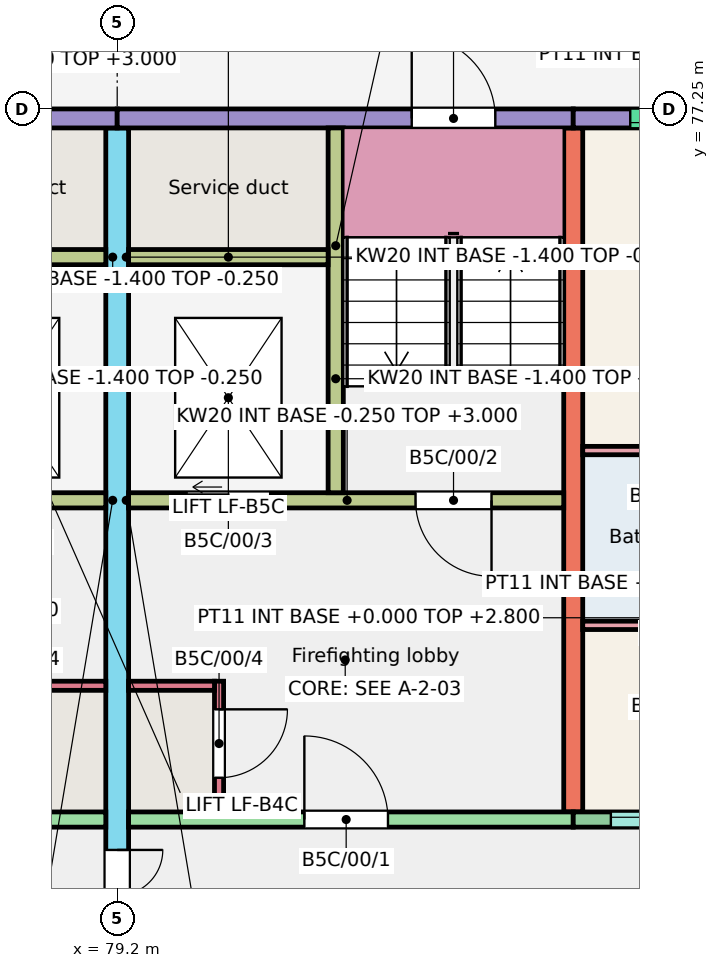
"""IFC4 building model, lengths in metres.
Left out: names, types, materials, properties, quantities, classifications, styles, units other than length and angle.
Written with IfcOpenShell. Run it as: python <this file> out.ifc"""

import sys

from ifc_helpers import new_model, si_unit, direction, frame, frame_2d, origin, place, context, subcontext, project, spatial, rectangle, extrude, element, fill, save


model = new_model("IFC4")
c1 = context("Model", 3, precision=1e-05, world=origin(), true_north=direction((0.0, 1.0)))
c2 = subcontext(c1, "Body", "Model", "MODEL_VIEW")
j1 = project(units=[si_unit("LENGTHUNIT", "METRE"), si_unit("PLANEANGLEUNIT", "RADIAN")], contexts=[c1])
p1 = place(None, origin())
s1 = spatial("IfcSite", under=j1, at=p1, CompositionType="ELEMENT")
p2 = place(p1, origin())
s2 = spatial("IfcBuilding", under=s1, at=p2, CompositionType="ELEMENT")
p3 = place(p2, origin())
s3 = spatial("IfcBuildingStorey", under=s2, at=p3, CompositionType="ELEMENT", Elevation=0.0)
p4 = place(p3, frame((79.2, 66.0, -0.25), z_axis=(0.0, 0.0, 1.0), x_axis=(0.0, 1.0, 0.0)))
e1 = element("IfcWall", 1, at=p4, inside=s3, PredefinedType="SHEAR", context=c2, shape_type="SweptSolid", body=[
    extrude(rectangle(XDim=11.0, YDim=0.3, at=frame_2d((5.5, 0.0))), origin(), (0.0, 0.0, 1.0), 3.25),
])
p5 = place(p4, frame((0.3, 0.0, 0.25)))
e2 = element("IfcOpeningElement", 2, at=p5, cuts=e1, PredefinedType="OPENING", context=c2, shape_type="SweptSolid", body=[
    extrude(rectangle(XDim=1.2, YDim=2.1, at=frame_2d((0.6, 1.05))), frame((0.0, 0.16, 0.0), z_axis=(0.0, -1.0, 0.0), x_axis=(1.0, 0.0, 0.0)), (0.0, 0.0, 1.0), 0.32),
])
p6 = place(p3, frame((85.2, 68.0, -0.25), z_axis=(0.0, 0.0, 1.0), x_axis=(0.0, 1.0, 0.0)))
e3 = element("IfcWall", 3, at=p6, inside=s3, PredefinedType="SHEAR", context=c2, shape_type="SweptSolid", body=[
    extrude(rectangle(XDim=9.0, YDim=0.25, at=frame_2d((4.5, 0.0))), origin(), (0.0, 0.0, 1.0), 3.25),
])
p7 = place(p3, frame((73.2, 77.125, -0.25), z_axis=(0.0, 0.0, 1.0), x_axis=(1.0, 0.0, 0.0)))
e4 = element("IfcWall", 4, at=p7, inside=s3, PredefinedType="SOLIDWALL", context=c2, shape_type="SweptSolid", body=[
    extrude(rectangle(XDim=6.0, YDim=0.25, at=frame_2d((3.0, 0.0))), origin(), (0.0, 0.0, 1.0), 3.25),
])
p8 = place(p7, frame((1.025, 0.0, 0.25)))
e5 = element("IfcOpeningElement", 5, at=p8, cuts=e4, PredefinedType="OPENING", context=c2, shape_type="SweptSolid", body=[
    extrude(rectangle(XDim=1.1, YDim=2.1, at=frame_2d((0.55, 1.05))), frame((0.0, 0.135, 0.0), z_axis=(0.0, -1.0, 0.0), x_axis=(1.0, 0.0, 0.0)), (0.0, 0.0, 1.0), 0.27),
])
p9 = place(p3, frame((73.2, 67.9, -0.25), z_axis=(0.0, 0.0, 1.0), x_axis=(1.0, 0.0, 0.0)))
e6 = element("IfcWall", 6, at=p9, inside=s3, PredefinedType="SHEAR", context=c2, shape_type="SweptSolid", body=[
    extrude(rectangle(XDim=5.85, YDim=0.2, at=frame_2d((2.925, 0.0))), origin(), (0.0, 0.0, 1.0), 3.25),
])
p10 = place(p9, frame((2.438, 0.0, 0.25)))
e7 = element("IfcOpeningElement", 7, at=p10, cuts=e6, PredefinedType="OPENING", context=c2, shape_type="SweptSolid", body=[
    extrude(rectangle(XDim=1.1, YDim=2.1, at=frame_2d((0.55, 1.05))), frame((0.0, 0.11, 0.0), z_axis=(0.0, -1.0, 0.0), x_axis=(1.0, 0.0, 0.0)), (0.0, 0.0, 1.0), 0.22),
])
p11 = place(p3, frame((73.325, 72.1, -0.25), z_axis=(0.0, 0.0, 1.0), x_axis=(1.0, 0.0, 0.0)))
e8 = element("IfcWall", 8, at=p11, inside=s3, PredefinedType="SHEAR", context=c2, shape_type="SweptSolid", body=[
    extrude(rectangle(XDim=5.725, YDim=0.2, at=frame_2d((2.863, 0.0))), origin(), (0.0, 0.0, 1.0), 3.25),
])
p12 = place(p11, frame((0.95, 0.0, 0.25)))
e9 = element("IfcOpeningElement", 9, at=p12, cuts=e8, PredefinedType="OPENING", context=c2, shape_type="SweptSolid", body=[
    extrude(rectangle(XDim=1.0, YDim=2.1, at=frame_2d((0.5, 1.05))), frame((0.0, 0.11, 0.0), z_axis=(0.0, -1.0, 0.0), x_axis=(1.0, 0.0, 0.0)), (0.0, 0.0, 1.0), 0.22),
])
p13 = place(p11, frame((3.863, 0.0, 0.25)))
e10 = element("IfcOpeningElement", 10, at=p13, cuts=e8, PredefinedType="OPENING", context=c2, shape_type="SweptSolid", body=[
    extrude(rectangle(XDim=1.1, YDim=2.1, at=frame_2d((0.55, 1.05))), frame((0.0, 0.11, 0.0), z_axis=(0.0, -1.0, 0.0), x_axis=(1.0, 0.0, 0.0)), (0.0, 0.0, 1.0), 0.22),
])
p14 = place(p3, frame((76.425, 75.3, -0.25), z_axis=(0.0, 0.0, 1.0), x_axis=(1.0, 0.0, 0.0)))
e11 = element("IfcWall", 11, at=p14, inside=s3, PredefinedType="SHEAR", context=c2, shape_type="SweptSolid", body=[
    extrude(rectangle(XDim=2.625, YDim=0.2, at=frame_2d((1.312, 0.0))), origin(), (0.0, 0.0, 1.0), 3.25),
])
p15 = place(p3, frame((77.92, 69.66, -0.25), z_axis=(0.0, 0.0, 1.0), x_axis=(1.0, 0.0, 0.0)))
e12 = element("IfcWall", 12, at=p15, inside=s3, PredefinedType="SHEAR", context=c2, shape_type="SweptSolid", body=[
    extrude(rectangle(XDim=1.13, YDim=0.12, at=frame_2d((0.565, 0.0))), origin(), (0.0, 0.0, 1.0), 3.25),
])
p16 = place(p3, frame((79.2, 77.125, -0.25), z_axis=(0.0, 0.0, 1.0), x_axis=(1.0, 0.0, 0.0)))
e13 = element("IfcWall", 13, at=p16, inside=s3, PredefinedType="SOLIDWALL", context=c2, shape_type="SweptSolid", body=[
    extrude(rectangle(XDim=6.0, YDim=0.25, at=frame_2d((3.0, 0.0))), origin(), (0.0, 0.0, 1.0), 3.25),
])
p17 = place(p16, frame((3.875, 0.0, 0.25)))
e14 = element("IfcOpeningElement", 14, at=p17, cuts=e13, PredefinedType="OPENING", context=c2, shape_type="SweptSolid", body=[
    extrude(rectangle(XDim=1.1, YDim=2.1, at=frame_2d((0.55, 1.05))), frame((0.0, 0.135, 0.0), z_axis=(0.0, -1.0, 0.0), x_axis=(1.0, 0.0, 0.0)), (0.0, 0.0, 1.0), 0.27),
])
p18 = place(p3, frame((79.35, 67.9, -0.25), z_axis=(0.0, 0.0, 1.0), x_axis=(1.0, 0.0, 0.0)))
e15 = element("IfcWall", 15, at=p18, inside=s3, PredefinedType="SHEAR", context=c2, shape_type="SweptSolid", body=[
    extrude(rectangle(XDim=5.85, YDim=0.2, at=frame_2d((2.925, 0.0))), origin(), (0.0, 0.0, 1.0), 3.25),
])
p19 = place(p18, frame((2.312, 0.0, 0.25)))
e16 = element("IfcOpeningElement", 16, at=p19, cuts=e15, PredefinedType="OPENING", context=c2, shape_type="SweptSolid", body=[
    extrude(rectangle(XDim=1.1, YDim=2.1, at=frame_2d((0.55, 1.05))), frame((0.0, 0.11, 0.0), z_axis=(0.0, -1.0, 0.0), x_axis=(1.0, 0.0, 0.0)), (0.0, 0.0, 1.0), 0.22),
])
p20 = place(p3, frame((79.35, 72.1, -0.25), z_axis=(0.0, 0.0, 1.0), x_axis=(1.0, 0.0, 0.0)))
e17 = element("IfcWall", 17, at=p20, inside=s3, PredefinedType="SHEAR", context=c2, shape_type="SweptSolid", body=[
    extrude(rectangle(XDim=5.725, YDim=0.2, at=frame_2d((2.862, 0.0))), origin(), (0.0, 0.0, 1.0), 3.25),
])
p21 = place(p20, frame((3.775, 0.0, 0.25)))
e18 = element("IfcOpeningElement", 18, at=p21, cuts=e17, PredefinedType="OPENING", context=c2, shape_type="SweptSolid", body=[
    extrude(rectangle(XDim=1.0, YDim=2.1, at=frame_2d((0.5, 1.05))), frame((0.0, 0.11, 0.0), z_axis=(0.0, -1.0, 0.0), x_axis=(1.0, 0.0, 0.0)), (0.0, 0.0, 1.0), 0.22),
])
p22 = place(p20, frame((0.762, 0.0, 0.25)))
e19 = element("IfcOpeningElement", 19, at=p22, cuts=e17, PredefinedType="OPENING", context=c2, shape_type="SweptSolid", body=[
    extrude(rectangle(XDim=1.1, YDim=2.1, at=frame_2d((0.55, 1.05))), frame((0.0, 0.11, 0.0), z_axis=(0.0, -1.0, 0.0), x_axis=(1.0, 0.0, 0.0)), (0.0, 0.0, 1.0), 0.22),
])
p23 = place(p3, frame((82.075, 72.2, -0.25), z_axis=(0.0, 0.0, 1.0), x_axis=(0.0, 1.0, 0.0)))
e20 = element("IfcWall", 20, at=p23, inside=s3, PredefinedType="SHEAR", context=c2, shape_type="SweptSolid", body=[
    extrude(rectangle(XDim=4.8, YDim=0.2, at=frame_2d((2.4, 0.0))), origin(), (0.0, 0.0, 1.0), 3.25),
])
p24 = place(p3, frame((79.35, 75.3, -0.25), z_axis=(0.0, 0.0, 1.0), x_axis=(1.0, 0.0, 0.0)))
e21 = element("IfcWall", 21, at=p24, inside=s3, PredefinedType="SHEAR", context=c2, shape_type="SweptSolid", body=[
    extrude(rectangle(XDim=2.625, YDim=0.2, at=frame_2d((1.312, 0.0))), origin(), (0.0, 0.0, 1.0), 3.25),
])
p25 = place(p3, frame((80.54, 68.0, -0.25), z_axis=(0.0, 0.0, 1.0), x_axis=(0.0, 1.0, 0.0)))
e22 = element("IfcWall", 22, at=p25, inside=s3, PredefinedType="SHEAR", context=c2, shape_type="SweptSolid", body=[
    extrude(rectangle(XDim=1.72, YDim=0.12, at=frame_2d((0.86, 0.0))), origin(), (0.0, 0.0, 1.0), 3.25),
])
p26 = place(p25, frame((0.45, 0.0, 0.25)))
e23 = element("IfcOpeningElement", 23, at=p26, cuts=e22, PredefinedType="OPENING", context=c2, shape_type="SweptSolid", body=[
    extrude(rectangle(XDim=0.9, YDim=2.1, at=frame_2d((0.45, 1.05))), frame((0.0, 0.07, 0.0), z_axis=(0.0, -1.0, 0.0), x_axis=(1.0, 0.0, 0.0)), (0.0, 0.0, 1.0), 0.14),
])
p27 = place(p3, frame((79.35, 69.66, -0.25), z_axis=(0.0, 0.0, 1.0), x_axis=(1.0, 0.0, 0.0)))
e24 = element("IfcWall", 24, at=p27, inside=s3, PredefinedType="SHEAR", context=c2, shape_type="SweptSolid", body=[
    extrude(rectangle(XDim=1.13, YDim=0.12, at=frame_2d((0.565, 0.0))), origin(), (0.0, 0.0, 1.0), 3.25),
])
p28 = place(p3, frame((85.2, 77.125, -0.25), z_axis=(0.0, 0.0, 1.0), x_axis=(1.0, 0.0, 0.0)))
e25 = element("IfcWall", 25, at=p28, inside=s3, PredefinedType="SOLIDWALL", context=c2, shape_type="SweptSolid", body=[
    extrude(rectangle(XDim=3.6, YDim=0.25, at=frame_2d((1.8, 0.0))), origin(), (0.0, 0.0, 1.0), 3.25),
])
p29 = place(p28, frame((0.75, 0.0, 1.45)))
e26 = element("IfcOpeningElement", 26, at=p29, cuts=e25, PredefinedType="OPENING", context=c2, shape_type="SweptSolid", body=[
    extrude(rectangle(XDim=2.1, YDim=1.2, at=frame_2d((1.05, 0.6))), frame((0.0, 0.135, 0.0), z_axis=(0.0, -1.0, 0.0), x_axis=(1.0, 0.0, 0.0)), (0.0, 0.0, 1.0), 0.27),
])
p30 = place(p3, frame((85.2, 67.9, -0.25), z_axis=(0.0, 0.0, 1.0), x_axis=(1.0, 0.0, 0.0)))
e27 = element("IfcWall", 27, at=p30, inside=s3, PredefinedType="SOLIDWALL", context=c2, shape_type="SweptSolid", body=[
    extrude(rectangle(XDim=3.6, YDim=0.2, at=frame_2d((1.8, 0.0))), origin(), (0.0, 0.0, 1.0), 3.25),
])
p31 = place(p30, frame((0.495, 0.0, 1.35)))
e28 = element("IfcOpeningElement", 28, at=p31, cuts=e27, PredefinedType="OPENING", context=c2, shape_type="SweptSolid", body=[
    extrude(rectangle(XDim=1.2, YDim=1.3, at=frame_2d((0.6, 0.65))), frame((0.0, 0.11, 0.0), z_axis=(0.0, -1.0, 0.0), x_axis=(1.0, 0.0, 0.0)), (0.0, 0.0, 1.0), 0.22),
])
p32 = place(p30, frame((2.325, 0.0, 0.25)))
e29 = element("IfcOpeningElement", 29, at=p32, cuts=e27, PredefinedType="OPENING", context=c2, shape_type="SweptSolid", body=[
    extrude(rectangle(XDim=1.0, YDim=2.1, at=frame_2d((0.5, 1.05))), frame((0.0, 0.11, 0.0), z_axis=(0.0, -1.0, 0.0), x_axis=(1.0, 0.0, 0.0)), (0.0, 0.0, 1.0), 0.22),
])
for number, where, z_axis, x_axis in (
    (30, (76.225, 72.1, -1.4), (0.0, 0.0, 1.0), (1.0, 0.0, 0.0)),
    (31, (76.225, 75.3, -1.4), (0.0, 0.0, 1.0), (1.0, 0.0, 0.0)),
):
    element("IfcWall", number, at=place(p3, frame(where, z_axis=z_axis, x_axis=x_axis)), inside=s3, PredefinedType="SHEAR", context=c2, shape_type="SweptSolid", body=[
        extrude(rectangle(XDim=2.975, YDim=0.2, at=frame_2d((1.487, 0.0))), origin(), (0.0, 0.0, 1.0), 1.15),
    ])
p33 = place(p3, frame((79.125, 72.2, -1.4), z_axis=(0.0, 0.0, 1.0), x_axis=(0.0, 1.0, 0.0)))
e32 = element("IfcWall", 32, at=p33, inside=s3, PredefinedType="SHEAR", context=c2, shape_type="SweptSolid", body=[
    extrude(rectangle(XDim=3.0, YDim=0.15, at=frame_2d((1.5, 0.0))), origin(), (0.0, 0.0, 1.0), 1.15),
])
for number, where, z_axis, x_axis in (
    (33, (79.2, 72.1, -1.4), (0.0, 0.0, 1.0), (1.0, 0.0, 0.0)),
    (34, (79.2, 75.3, -1.4), (0.0, 0.0, 1.0), (1.0, 0.0, 0.0)),
):
    element("IfcWall", number, at=place(p3, frame(where, z_axis=z_axis, x_axis=x_axis)), inside=s3, PredefinedType="SHEAR", context=c2, shape_type="SweptSolid", body=[
        extrude(rectangle(XDim=2.975, YDim=0.2, at=frame_2d((1.488, 0.0))), origin(), (0.0, 0.0, 1.0), 1.15),
    ])
p34 = place(p3, frame((82.075, 72.2, -1.4), z_axis=(0.0, 0.0, 1.0), x_axis=(0.0, 1.0, 0.0)))
e35 = element("IfcWall", 35, at=p34, inside=s3, PredefinedType="SHEAR", context=c2, shape_type="SweptSolid", body=[
    extrude(rectangle(XDim=3.0, YDim=0.2, at=frame_2d((1.5, 0.0))), origin(), (0.0, 0.0, 1.0), 1.15),
])
p35 = place(p3, frame((79.275, 72.2, -1.4), z_axis=(0.0, 0.0, 1.0), x_axis=(0.0, 1.0, 0.0)))
e36 = element("IfcWall", 36, at=p35, inside=s3, PredefinedType="SHEAR", context=c2, shape_type="SweptSolid", body=[
    extrude(rectangle(XDim=3.0, YDim=0.15, at=frame_2d((1.5, 0.0))), origin(), (0.0, 0.0, 1.0), 1.15),
])
p36 = place(p3, frame((85.325, 70.455, 0.0), z_axis=(0.0, 0.0, 1.0), x_axis=(1.0, 0.0, 0.0)))
e37 = element("IfcWall", 37, at=p36, inside=s3, PredefinedType="PARTITIONING", context=c2, shape_type="SweptSolid", body=[
    extrude(rectangle(XDim=1.94, YDim=0.11, at=frame_2d((0.97, 0.0))), origin(), (0.0, 0.0, 1.0), 2.8),
])
p37 = place(p3, frame((85.325, 72.755, 0.0), z_axis=(0.0, 0.0, 1.0), x_axis=(1.0, 0.0, 0.0)))
e38 = element("IfcWall", 38, at=p37, inside=s3, PredefinedType="PARTITIONING", context=c2, shape_type="SweptSolid", body=[
    extrude(rectangle(XDim=3.35, YDim=0.11, at=frame_2d((1.675, 0.0))), origin(), (0.0, 0.0, 1.0), 2.8),
])
p38 = place(p37, frame((2.25, 0.0, 0.0)))
e39 = element("IfcOpeningElement", 39, at=p38, cuts=e38, PredefinedType="OPENING", context=c2, shape_type="SweptSolid", body=[
    extrude(rectangle(XDim=0.9, YDim=2.1, at=frame_2d((0.45, 1.05))), frame((0.0, 0.065, 0.0), z_axis=(0.0, -1.0, 0.0), x_axis=(1.0, 0.0, 0.0)), (0.0, 0.0, 1.0), 0.13),
])
p39 = place(p31, origin())
e40 = element("IfcWindow", 40, at=p39, inside=s3, PartitioningType="SINGLE_PANEL", PredefinedType="WINDOW", context=c2, shape_type="SweptSolid", body=[
    extrude(rectangle(XDim=1.2, YDim=1.3, at=frame_2d((0.6, 0.65))), frame((0.0, 0.06, 0.0), z_axis=(0.0, -1.0, 0.0), x_axis=(1.0, 0.0, 0.0)), (0.0, 0.0, 1.0), 0.06),
])
fill(e28, e40)
p40 = place(p29, origin())
e41 = element("IfcWindow", 41, at=p40, inside=s3, PartitioningType="SINGLE_PANEL", PredefinedType="WINDOW", context=c2, shape_type="SweptSolid", body=[
    extrude(rectangle(XDim=2.1, YDim=1.2, at=frame_2d((1.05, 0.6))), frame((0.0, -0.025, 0.0), z_axis=(0.0, -1.0, 0.0), x_axis=(1.0, 0.0, 0.0)), (0.0, 0.0, 1.0), 0.06),
])
fill(e26, e41)
p41 = place(p19, origin())
e42 = element("IfcDoor", 42, at=p41, inside=s3, OperationType="SINGLE_SWING_LEFT", PredefinedType="DOOR", context=c2, shape_type="SweptSolid", body=[
    extrude(rectangle(XDim=1.1, YDim=2.1, at=frame_2d((0.55, 1.05))), frame((0.0, 0.025, 0.0), z_axis=(0.0, -1.0, 0.0), x_axis=(1.0, 0.0, 0.0)), (0.0, 0.0, 1.0), 0.05),
])
fill(e16, e42)
p42 = place(p21, origin())
e43 = element("IfcDoor", 43, at=p42, inside=s3, OperationType="SINGLE_SWING_RIGHT", PredefinedType="DOOR", context=c2, shape_type="SweptSolid", body=[
    extrude(rectangle(XDim=1.0, YDim=2.1, at=frame_2d((0.5, 1.05))), frame((0.0, 0.025, 0.0), z_axis=(0.0, -1.0, 0.0), x_axis=(1.0, 0.0, 0.0)), (0.0, 0.0, 1.0), 0.05),
])
fill(e18, e43)
p43 = place(p22, origin())
e44 = element("IfcDoor", 44, at=p43, inside=s3, OperationType="DOUBLE_DOOR_SLIDING", PredefinedType="DOOR", context=c2, shape_type="SweptSolid", body=[
    extrude(rectangle(XDim=1.1, YDim=2.1, at=frame_2d((0.55, 1.05))), frame((0.0, 0.025, 0.0), z_axis=(0.0, -1.0, 0.0), x_axis=(1.0, 0.0, 0.0)), (0.0, 0.0, 1.0), 0.05),
])
fill(e19, e44)
p44 = place(p26, origin())
e45 = element("IfcDoor", 45, at=p44, inside=s3, OperationType="SINGLE_SWING_RIGHT", PredefinedType="DOOR", context=c2, shape_type="SweptSolid", body=[
    extrude(rectangle(XDim=0.9, YDim=2.1, at=frame_2d((0.45, 1.05))), frame((0.0, 0.025, 0.0), z_axis=(0.0, -1.0, 0.0), x_axis=(1.0, 0.0, 0.0)), (0.0, 0.0, 1.0), 0.05),
])
fill(e23, e45)
p45 = place(p17, origin())
e46 = element("IfcDoor", 46, at=p45, inside=s3, OperationType="SINGLE_SWING_LEFT", PredefinedType="DOOR", context=c2, shape_type="SweptSolid", body=[
    extrude(rectangle(XDim=1.1, YDim=2.1, at=frame_2d((0.55, 1.05))), frame((0.0, 0.025, 0.0), z_axis=(0.0, -1.0, 0.0), x_axis=(1.0, 0.0, 0.0)), (0.0, 0.0, 1.0), 0.05),
])
fill(e14, e46)
p46 = place(p5, origin())
e47 = element("IfcDoor", 47, at=p46, inside=s3, OperationType="DOUBLE_DOOR_SINGLE_SWING", PredefinedType="DOOR", context=c2, shape_type="SweptSolid", body=[
    extrude(rectangle(XDim=1.2, YDim=2.1, at=frame_2d((0.6, 1.05))), frame((0.0, 0.025, 0.0), z_axis=(0.0, -1.0, 0.0), x_axis=(1.0, 0.0, 0.0)), (0.0, 0.0, 1.0), 0.05),
])
fill(e2, e47)
save(model, sys.argv[1])
